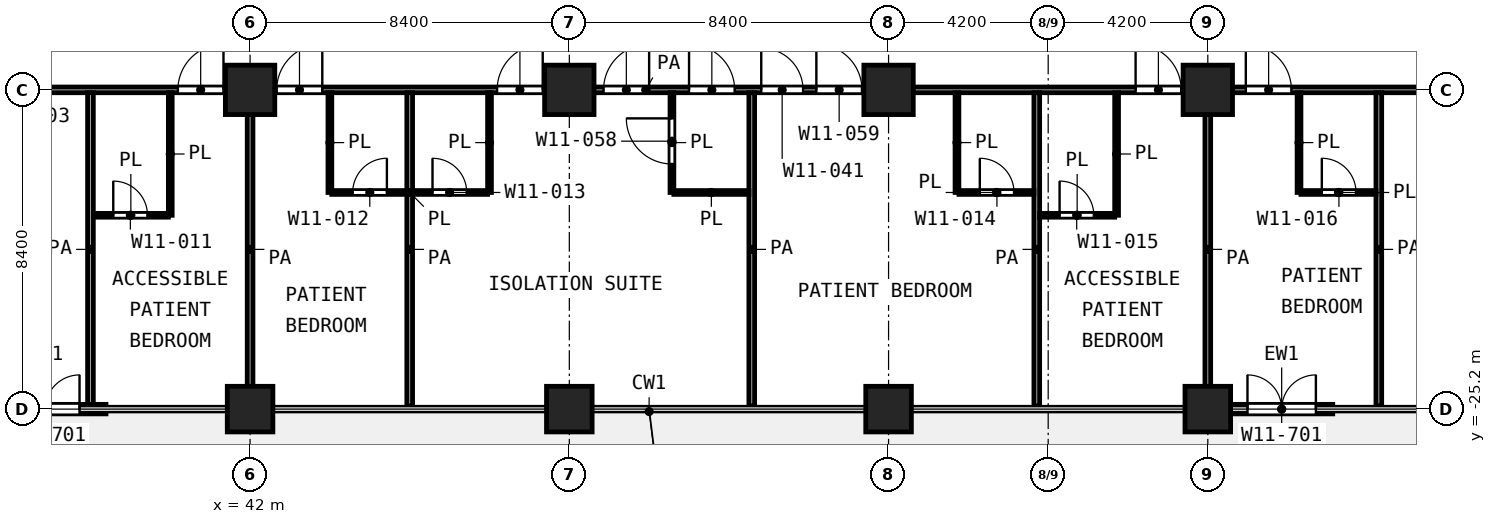
"""IFC4 building model, lengths in metres.
Left out: names, types, materials, properties, quantities, classifications, styles, units other than length and angle.
Written with IfcOpenShell. Run it as: python <this file> out.ifc"""

import sys

from ifc_helpers import new_model, si_unit, direction, frame, frame_2d, origin, origin_2d, place, context, subcontext, project, spatial, rectangle, extrude, element, fill, save


model = new_model("IFC4")
c1 = context("Model", 3, precision=1e-05, world=origin(), true_north=direction((0.0, 1.0)))
c2 = subcontext(c1, "Body", "Model", "MODEL_VIEW")
j1 = project(units=[si_unit("LENGTHUNIT", "METRE"), si_unit("PLANEANGLEUNIT", "RADIAN")], contexts=[c1])
p1 = place(None, origin())
s1 = spatial("IfcSite", under=j1, at=p1, CompositionType="ELEMENT")
p2 = place(p1, origin())
s2 = spatial("IfcBuilding", under=s1, at=p2, CompositionType="ELEMENT")
p3 = place(p2, frame((0.0, 0.0, 72.8)))
s3 = spatial("IfcBuildingStorey", under=s2, at=p3, CompositionType="ELEMENT", Elevation=72.8)
for number, where, z_axis, x_axis in (
    (1, (42.0, -16.8, 0.0), (0.0, 0.0, 1.0), (1.0, 0.0, 0.0)),
    (2, (50.4, -16.8, 0.0), (0.0, 0.0, 1.0), (1.0, 0.0, 0.0)),
    (3, (58.8, -16.8, 0.0), (0.0, 0.0, 1.0), (1.0, 0.0, 0.0)),
    (4, (67.2, -16.8, 0.0), (0.0, 0.0, 1.0), (1.0, 0.0, 0.0)),
):
    element("IfcColumn", number, at=place(p3, frame(where, z_axis=z_axis, x_axis=x_axis)), inside=s3, PredefinedType="COLUMN", context=c2, shape_type="SweptSolid", body=[
        extrude(rectangle(XDim=1.3, YDim=1.3, at=origin_2d()), origin(), (0.0, 0.0, 1.0), 4.2),
    ])
for number, where, z_axis, x_axis in (
    (5, (42.0, -25.2, 0.0), (0.0, 0.0, 1.0), (1.0, 0.0, 0.0)),
    (6, (50.4, -25.2, 0.0), (0.0, 0.0, 1.0), (1.0, 0.0, 0.0)),
    (7, (58.8, -25.2, 0.0), (0.0, 0.0, 1.0), (1.0, 0.0, 0.0)),
    (8, (67.2, -25.2, 0.0), (0.0, 0.0, 1.0), (1.0, 0.0, 0.0)),
):
    element("IfcColumn", number, at=place(p3, frame(where, z_axis=z_axis, x_axis=x_axis)), inside=s3, PredefinedType="COLUMN", context=c2, shape_type="SweptSolid", body=[
        extrude(rectangle(XDim=1.2, YDim=1.2, at=origin_2d()), origin(), (0.0, 0.0, 1.0), 4.2),
    ])
p4 = place(p3, frame((35.017, -25.2, 0.0), z_axis=(0.0, 0.0, 1.0), x_axis=(1.0, 0.0, 0.0)))
e9 = element("IfcWall", 9, at=p4, inside=s3, PredefinedType="SOLIDWALL", context=c2, shape_type="SweptSolid", body=[
    extrude(rectangle(XDim=3.192, YDim=0.25, at=frame_2d((1.596, 0.0))), origin(), (0.0, 0.0, 1.0), 3.78),
])
p5 = place(p4, frame((0.696, 0.0, 0.0)))
e10 = element("IfcOpeningElement", 10, at=p5, cuts=e9, PredefinedType="OPENING", context=c2, shape_type="SweptSolid", body=[
    extrude(rectangle(XDim=1.8, YDim=2.1, at=frame_2d((0.9, 1.05))), frame((0.0, 0.135, 0.0), z_axis=(0.0, -1.0, 0.0), x_axis=(1.0, 0.0, 0.0)), (0.0, 0.0, 1.0), 0.27),
])
p6 = place(p3, frame((67.8, -25.2, 0.0), z_axis=(0.0, 0.0, 1.0), x_axis=(1.0, 0.0, 0.0)))
e11 = element("IfcWall", 11, at=p6, inside=s3, PredefinedType="SOLIDWALL", context=c2, shape_type="SweptSolid", body=[
    extrude(rectangle(XDim=2.688, YDim=0.25, at=frame_2d((1.344, 0.0))), origin(), (0.0, 0.0, 1.0), 3.78),
])
p7 = place(p6, frame((0.444, 0.0, 0.0)))
e12 = element("IfcOpeningElement", 12, at=p7, cuts=e11, PredefinedType="OPENING", context=c2, shape_type="SweptSolid", body=[
    extrude(rectangle(XDim=1.8, YDim=2.1, at=frame_2d((0.9, 1.05))), frame((0.0, 0.135, 0.0), z_axis=(0.0, -1.0, 0.0), x_axis=(1.0, 0.0, 0.0)), (0.0, 0.0, 1.0), 0.27),
])
p8 = place(p3, frame((37.875, -20.1, 0.0), z_axis=(0.0, 0.0, 1.0), x_axis=(1.0, 0.0, 0.0)))
e13 = element("IfcWall", 13, at=p8, inside=s3, PredefinedType="PARTITIONING", context=c2, shape_type="SweptSolid", body=[
    extrude(rectangle(XDim=1.975, YDim=0.1, at=frame_2d((0.988, 0.0))), origin(), (0.0, 0.0, 1.0), 3.9),
])
p9 = place(p8, frame((0.525, 0.0, 0.0)))
e14 = element("IfcOpeningElement", 14, at=p9, cuts=e13, PredefinedType="OPENING", context=c2, shape_type="SweptSolid", body=[
    extrude(rectangle(XDim=0.9, YDim=2.1, at=frame_2d((0.45, 1.05))), frame((0.0, 0.06, 0.0), z_axis=(0.0, -1.0, 0.0), x_axis=(1.0, 0.0, 0.0)), (0.0, 0.0, 1.0), 0.12),
])
p10 = place(p3, frame((62.775, -20.1, 0.0), z_axis=(0.0, 0.0, 1.0), x_axis=(1.0, 0.0, 0.0)))
e15 = element("IfcWall", 15, at=p10, inside=s3, PredefinedType="PARTITIONING", context=c2, shape_type="SweptSolid", body=[
    extrude(rectangle(XDim=1.975, YDim=0.1, at=frame_2d((0.988, 0.0))), origin(), (0.0, 0.0, 1.0), 3.9),
])
p11 = place(p10, frame((0.525, 0.0, 0.0)))
e16 = element("IfcOpeningElement", 16, at=p11, cuts=e15, PredefinedType="OPENING", context=c2, shape_type="SweptSolid", body=[
    extrude(rectangle(XDim=0.9, YDim=2.1, at=frame_2d((0.45, 1.05))), frame((0.0, 0.06, 0.0), z_axis=(0.0, -1.0, 0.0), x_axis=(1.0, 0.0, 0.0)), (0.0, 0.0, 1.0), 0.12),
])
p12 = place(p3, frame((44.15, -19.5, 0.0), z_axis=(0.0, 0.0, 1.0), x_axis=(1.0, 0.0, 0.0)))
e17 = element("IfcWall", 17, at=p12, inside=s3, PredefinedType="PARTITIONING", context=c2, shape_type="SweptSolid", body=[
    extrude(rectangle(XDim=4.1, YDim=0.1, at=frame_2d((2.05, 0.0))), origin(), (0.0, 0.0, 1.0), 3.9),
])
p13 = place(p12, frame((0.55, 0.0, 0.0)))
e18 = element("IfcOpeningElement", 18, at=p13, cuts=e17, PredefinedType="OPENING", context=c2, shape_type="SweptSolid", body=[
    extrude(rectangle(XDim=0.9, YDim=2.1, at=frame_2d((0.45, 1.05))), frame((0.0, 0.06, 0.0), z_axis=(0.0, -1.0, 0.0), x_axis=(1.0, 0.0, 0.0)), (0.0, 0.0, 1.0), 0.12),
])
p14 = place(p12, frame((2.65, 0.0, 0.0)))
e19 = element("IfcOpeningElement", 19, at=p14, cuts=e17, PredefinedType="OPENING", context=c2, shape_type="SweptSolid", body=[
    extrude(rectangle(XDim=0.9, YDim=2.1, at=frame_2d((0.45, 1.05))), frame((0.0, 0.06, 0.0), z_axis=(0.0, -1.0, 0.0), x_axis=(1.0, 0.0, 0.0)), (0.0, 0.0, 1.0), 0.12),
])
p15 = place(p3, frame((53.15, -19.5, 0.0), z_axis=(0.0, 0.0, 1.0), x_axis=(1.0, 0.0, 0.0)))
e20 = element("IfcWall", 20, at=p15, inside=s3, PredefinedType="PARTITIONING", context=c2, shape_type="SweptSolid", body=[
    extrude(rectangle(XDim=1.975, YDim=0.1, at=frame_2d((0.988, 0.0))), origin(), (0.0, 0.0, 1.0), 3.9),
])
p16 = place(p3, frame((60.652, -19.5, 0.0), z_axis=(0.0, 0.0, 1.0), x_axis=(1.0, 0.0, 0.0)))
e21 = element("IfcWall", 21, at=p16, inside=s3, PredefinedType="PARTITIONING", context=c2, shape_type="SweptSolid", body=[
    extrude(rectangle(XDim=1.973, YDim=0.1, at=frame_2d((0.986, 0.0))), origin(), (0.0, 0.0, 1.0), 3.9),
])
p17 = place(p16, frame((0.549, 0.0, 0.0)))
e22 = element("IfcOpeningElement", 22, at=p17, cuts=e21, PredefinedType="OPENING", context=c2, shape_type="SweptSolid", body=[
    extrude(rectangle(XDim=0.9, YDim=2.1, at=frame_2d((0.45, 1.05))), frame((0.0, 0.06, 0.0), z_axis=(0.0, -1.0, 0.0), x_axis=(1.0, 0.0, 0.0)), (0.0, 0.0, 1.0), 0.12),
])
p18 = place(p3, frame((69.65, -19.5, 0.0), z_axis=(0.0, 0.0, 1.0), x_axis=(1.0, 0.0, 0.0)))
e23 = element("IfcWall", 23, at=p18, inside=s3, PredefinedType="PARTITIONING", context=c2, shape_type="SweptSolid", body=[
    extrude(rectangle(XDim=1.975, YDim=0.1, at=frame_2d((0.988, 0.0))), origin(), (0.0, 0.0, 1.0), 3.9),
])
p19 = place(p18, frame((0.55, 0.0, 0.0)))
e24 = element("IfcOpeningElement", 24, at=p19, cuts=e23, PredefinedType="OPENING", context=c2, shape_type="SweptSolid", body=[
    extrude(rectangle(XDim=0.9, YDim=2.1, at=frame_2d((0.45, 1.05))), frame((0.0, 0.06, 0.0), z_axis=(0.0, -1.0, 0.0), x_axis=(1.0, 0.0, 0.0)), (0.0, 0.0, 1.0), 0.12),
])
p20 = place(p3, frame((39.9, -20.1, 0.0), z_axis=(0.0, 0.0, 1.0), x_axis=(0.0, 1.0, 0.0)))
e25 = element("IfcWall", 25, at=p20, inside=s3, PredefinedType="PARTITIONING", context=c2, shape_type="SweptSolid", body=[
    extrude(rectangle(XDim=3.225, YDim=0.1, at=frame_2d((1.613, 0.0))), origin(), (0.0, 0.0, 1.0), 3.9),
])
for number, where, z_axis, x_axis in (
    (26, (44.1, -19.5, 0.0), (0.0, 0.0, 1.0), (0.0, 1.0, 0.0)),
    (27, (48.3, -19.5, 0.0), (0.0, 0.0, 1.0), (0.0, 1.0, 0.0)),
):
    element("IfcWall", number, at=place(p3, frame(where, z_axis=z_axis, x_axis=x_axis)), inside=s3, PredefinedType="PARTITIONING", context=c2, shape_type="SweptSolid", body=[
        extrude(rectangle(XDim=2.625, YDim=0.1, at=frame_2d((1.312, 0.0))), origin(), (0.0, 0.0, 1.0), 3.9),
    ])
p21 = place(p3, frame((53.1, -19.5, 0.0), z_axis=(0.0, 0.0, 1.0), x_axis=(0.0, 1.0, 0.0)))
e28 = element("IfcWall", 28, at=p21, inside=s3, PredefinedType="PARTITIONING", context=c2, shape_type="SweptSolid", body=[
    extrude(rectangle(XDim=2.625, YDim=0.1, at=frame_2d((1.312, 0.0))), origin(), (0.0, 0.0, 1.0), 3.9),
])
p22 = place(p21, frame((0.75, 0.0, 0.0)))
e29 = element("IfcOpeningElement", 29, at=p22, cuts=e28, PredefinedType="OPENING", context=c2, shape_type="SweptSolid", body=[
    extrude(rectangle(XDim=1.2, YDim=2.1, at=frame_2d((0.6, 1.05))), frame((0.0, 0.06, 0.0), z_axis=(0.0, -1.0, 0.0), x_axis=(1.0, 0.0, 0.0)), (0.0, 0.0, 1.0), 0.12),
])
p23 = place(p3, frame((60.6, -19.499, 0.0), z_axis=(0.0, 0.0, 1.0), x_axis=(0.0, 1.0, 0.0)))
e30 = element("IfcWall", 30, at=p23, inside=s3, PredefinedType="PARTITIONING", context=c2, shape_type="SweptSolid", body=[
    extrude(rectangle(XDim=2.624, YDim=0.1, at=frame_2d((1.312, 0.0))), origin(), (0.0, 0.0, 1.0), 3.9),
])
p24 = place(p3, frame((64.8, -20.1, 0.0), z_axis=(0.0, 0.0, 1.0), x_axis=(0.0, 1.0, 0.0)))
e31 = element("IfcWall", 31, at=p24, inside=s3, PredefinedType="PARTITIONING", context=c2, shape_type="SweptSolid", body=[
    extrude(rectangle(XDim=3.225, YDim=0.1, at=frame_2d((1.613, 0.0))), origin(), (0.0, 0.0, 1.0), 3.9),
])
p25 = place(p3, frame((69.6, -19.5, 0.0), z_axis=(0.0, 0.0, 1.0), x_axis=(0.0, 1.0, 0.0)))
e32 = element("IfcWall", 32, at=p25, inside=s3, PredefinedType="PARTITIONING", context=c2, shape_type="SweptSolid", body=[
    extrude(rectangle(XDim=2.625, YDim=0.1, at=frame_2d((1.312, 0.0))), origin(), (0.0, 0.0, 1.0), 3.9),
])
p26 = place(p3, frame((25.1, -16.8, 0.0), z_axis=(0.0, 0.0, 1.0), x_axis=(1.0, 0.0, 0.0)))
e33 = element("IfcWall", 33, at=p26, inside=s3, PredefinedType="PARTITIONING", context=c2, shape_type="SweptSolid", body=[
    extrude(rectangle(XDim=54.62, YDim=0.15, at=frame_2d((27.31, 0.0))), origin(), (0.0, 0.0, 1.0), 3.9),
])
p27 = place(p26, frame((1.45, 0.0, 0.0)))
e34 = element("IfcOpeningElement", 34, at=p27, cuts=e33, PredefinedType="OPENING", context=c2, shape_type="SweptSolid", body=[
    extrude(rectangle(XDim=1.5, YDim=2.1, at=frame_2d((0.75, 1.05))), frame((0.0, 0.085, 0.0), z_axis=(0.0, -1.0, 0.0), x_axis=(1.0, 0.0, 0.0)), (0.0, 0.0, 1.0), 0.17),
])
p28 = place(p26, frame((9.25, 0.0, 0.0)))
e35 = element("IfcOpeningElement", 35, at=p28, cuts=e33, PredefinedType="OPENING", context=c2, shape_type="SweptSolid", body=[
    extrude(rectangle(XDim=1.5, YDim=2.1, at=frame_2d((0.75, 1.05))), frame((0.0, 0.085, 0.0), z_axis=(0.0, -1.0, 0.0), x_axis=(1.0, 0.0, 0.0)), (0.0, 0.0, 1.0), 0.17),
])
p29 = place(p26, frame((15.0, 0.0, 0.0)))
e36 = element("IfcOpeningElement", 36, at=p29, cuts=e33, PredefinedType="OPENING", context=c2, shape_type="SweptSolid", body=[
    extrude(rectangle(XDim=1.2, YDim=2.1, at=frame_2d((0.6, 1.05))), frame((0.0, 0.085, 0.0), z_axis=(0.0, -1.0, 0.0), x_axis=(1.0, 0.0, 0.0)), (0.0, 0.0, 1.0), 0.17),
])
p30 = place(p26, frame((17.6, 0.0, 0.0)))
e37 = element("IfcOpeningElement", 37, at=p30, cuts=e33, PredefinedType="OPENING", context=c2, shape_type="SweptSolid", body=[
    extrude(rectangle(XDim=1.2, YDim=2.1, at=frame_2d((0.6, 1.05))), frame((0.0, 0.085, 0.0), z_axis=(0.0, -1.0, 0.0), x_axis=(1.0, 0.0, 0.0)), (0.0, 0.0, 1.0), 0.17),
])
p31 = place(p26, frame((26.2, 0.0, 0.0)))
e38 = element("IfcOpeningElement", 38, at=p31, cuts=e33, PredefinedType="OPENING", context=c2, shape_type="SweptSolid", body=[
    extrude(rectangle(XDim=1.2, YDim=2.1, at=frame_2d((0.6, 1.05))), frame((0.0, 0.085, 0.0), z_axis=(0.0, -1.0, 0.0), x_axis=(1.0, 0.0, 0.0)), (0.0, 0.0, 1.0), 0.17),
])
p32 = place(p26, frame((23.4, 0.0, 0.0)))
e39 = element("IfcOpeningElement", 39, at=p32, cuts=e33, PredefinedType="OPENING", context=c2, shape_type="SweptSolid", body=[
    extrude(rectangle(XDim=1.2, YDim=2.1, at=frame_2d((0.6, 1.05))), frame((0.0, 0.085, 0.0), z_axis=(0.0, -1.0, 0.0), x_axis=(1.0, 0.0, 0.0)), (0.0, 0.0, 1.0), 0.17),
])
p33 = place(p26, frame((28.45, 0.0, 0.0)))
e40 = element("IfcOpeningElement", 40, at=p33, cuts=e33, PredefinedType="OPENING", context=c2, shape_type="SweptSolid", body=[
    extrude(rectangle(XDim=1.2, YDim=2.1, at=frame_2d((0.6, 1.05))), frame((0.0, 0.085, 0.0), z_axis=(0.0, -1.0, 0.0), x_axis=(1.0, 0.0, 0.0)), (0.0, 0.0, 1.0), 0.17),
])
p34 = place(p26, frame((31.8, 0.0, 0.0)))
e41 = element("IfcOpeningElement", 41, at=p34, cuts=e33, PredefinedType="OPENING", context=c2, shape_type="SweptSolid", body=[
    extrude(rectangle(XDim=1.2, YDim=2.1, at=frame_2d((0.6, 1.05))), frame((0.0, 0.085, 0.0), z_axis=(0.0, -1.0, 0.0), x_axis=(1.0, 0.0, 0.0)), (0.0, 0.0, 1.0), 0.17),
])
p35 = place(p26, frame((30.35, 0.0, 0.0)))
e42 = element("IfcOpeningElement", 42, at=p35, cuts=e33, PredefinedType="OPENING", context=c2, shape_type="SweptSolid", body=[
    extrude(rectangle(XDim=1.1, YDim=2.1, at=frame_2d((0.55, 1.05))), frame((0.0, 0.085, 0.0), z_axis=(0.0, -1.0, 0.0), x_axis=(1.0, 0.0, 0.0)), (0.0, 0.0, 1.0), 0.17),
])
p36 = place(p26, frame((40.2, 0.0, 0.0)))
e43 = element("IfcOpeningElement", 43, at=p36, cuts=e33, PredefinedType="OPENING", context=c2, shape_type="SweptSolid", body=[
    extrude(rectangle(XDim=1.2, YDim=2.1, at=frame_2d((0.6, 1.05))), frame((0.0, 0.085, 0.0), z_axis=(0.0, -1.0, 0.0), x_axis=(1.0, 0.0, 0.0)), (0.0, 0.0, 1.0), 0.17),
])
p37 = place(p26, frame((43.1, 0.0, 0.0)))
e44 = element("IfcOpeningElement", 44, at=p37, cuts=e33, PredefinedType="OPENING", context=c2, shape_type="SweptSolid", body=[
    extrude(rectangle(XDim=1.2, YDim=2.1, at=frame_2d((0.6, 1.05))), frame((0.0, 0.085, 0.0), z_axis=(0.0, -1.0, 0.0), x_axis=(1.0, 0.0, 0.0)), (0.0, 0.0, 1.0), 0.17),
])
p38 = place(p26, frame((51.2, 0.0, 0.0)))
e45 = element("IfcOpeningElement", 45, at=p38, cuts=e33, PredefinedType="OPENING", context=c2, shape_type="SweptSolid", body=[
    extrude(rectangle(XDim=1.5, YDim=2.1, at=frame_2d((0.75, 1.05))), frame((0.0, 0.085, 0.0), z_axis=(0.0, -1.0, 0.0), x_axis=(1.0, 0.0, 0.0)), (0.0, 0.0, 1.0), 0.17),
])
for number, where, z_axis, x_axis in (
    (46, (37.8, -25.12, 0.0), (0.0, 0.0, 1.0), (0.0, 1.0, 0.0)),
    (47, (42.0, -25.12, 0.0), (0.0, 0.0, 1.0), (0.0, 1.0, 0.0)),
    (48, (46.2, -25.12, 0.0), (0.0, 0.0, 1.0), (0.0, 1.0, 0.0)),
    (49, (55.2, -25.12, 0.0), (0.0, 0.0, 1.0), (0.0, 1.0, 0.0)),
    (50, (62.7, -25.12, 0.0), (0.0, 0.0, 1.0), (0.0, 1.0, 0.0)),
    (51, (67.2, -25.12, 0.0), (0.0, 0.0, 1.0), (0.0, 1.0, 0.0)),
    (52, (71.7, -25.12, 0.0), (0.0, 0.0, 1.0), (0.0, 1.0, 0.0)),
):
    element("IfcWall", number, at=place(p3, frame(where, z_axis=z_axis, x_axis=x_axis)), inside=s3, PredefinedType="PARTITIONING", context=c2, shape_type="SweptSolid", body=[
        extrude(rectangle(XDim=8.245, YDim=0.15, at=frame_2d((4.123, 0.0))), origin(), (0.0, 0.0, 1.0), 3.9),
    ])
p39 = place(p5, origin())
e53 = element("IfcDoor", 53, at=p39, inside=s3, OperationType="DOUBLE_DOOR_SINGLE_SWING", PredefinedType="DOOR", context=c2, shape_type="SweptSolid", body=[
    extrude(rectangle(XDim=1.8, YDim=2.1, at=frame_2d((0.9, 1.05))), frame((0.0, 0.025, 0.0), z_axis=(0.0, -1.0, 0.0), x_axis=(1.0, 0.0, 0.0)), (0.0, 0.0, 1.0), 0.05),
])
fill(e10, e53)
p40 = place(p7, origin())
e54 = element("IfcDoor", 54, at=p40, inside=s3, OperationType="DOUBLE_DOOR_SINGLE_SWING", PredefinedType="DOOR", context=c2, shape_type="SweptSolid", body=[
    extrude(rectangle(XDim=1.8, YDim=2.1, at=frame_2d((0.9, 1.05))), frame((0.0, 0.025, 0.0), z_axis=(0.0, -1.0, 0.0), x_axis=(1.0, 0.0, 0.0)), (0.0, 0.0, 1.0), 0.05),
])
fill(e12, e54)
p41 = place(p29, origin())
e55 = element("IfcDoor", 55, at=p41, inside=s3, OperationType="SINGLE_SWING_RIGHT", PredefinedType="DOOR", context=c2, shape_type="SweptSolid", body=[
    extrude(rectangle(XDim=1.2, YDim=2.1, at=frame_2d((0.6, 1.05))), frame((0.0, 0.025, 0.0), z_axis=(0.0, -1.0, 0.0), x_axis=(1.0, 0.0, 0.0)), (0.0, 0.0, 1.0), 0.05),
])
fill(e36, e55)
p42 = place(p9, origin())
e56 = element("IfcDoor", 56, at=p42, inside=s3, OperationType="SINGLE_SWING_LEFT", PredefinedType="DOOR", context=c2, shape_type="SweptSolid", body=[
    extrude(rectangle(XDim=0.9, YDim=2.1, at=frame_2d((0.45, 1.05))), frame((0.0, 0.025, 0.0), z_axis=(0.0, -1.0, 0.0), x_axis=(1.0, 0.0, 0.0)), (0.0, 0.0, 1.0), 0.05),
])
fill(e14, e56)
p43 = place(p30, origin())
e57 = element("IfcDoor", 57, at=p43, inside=s3, OperationType="SINGLE_SWING_RIGHT", PredefinedType="DOOR", context=c2, shape_type="SweptSolid", body=[
    extrude(rectangle(XDim=1.2, YDim=2.1, at=frame_2d((0.6, 1.05))), frame((0.0, 0.025, 0.0), z_axis=(0.0, -1.0, 0.0), x_axis=(1.0, 0.0, 0.0)), (0.0, 0.0, 1.0), 0.05),
])
fill(e37, e57)
p44 = place(p13, origin())
e58 = element("IfcDoor", 58, at=p44, inside=s3, OperationType="SINGLE_SWING_RIGHT", PredefinedType="DOOR", context=c2, shape_type="SweptSolid", body=[
    extrude(rectangle(XDim=0.9, YDim=2.1, at=frame_2d((0.45, 1.05))), frame((0.0, 0.025, 0.0), z_axis=(0.0, -1.0, 0.0), x_axis=(1.0, 0.0, 0.0)), (0.0, 0.0, 1.0), 0.05),
])
fill(e18, e58)
p45 = place(p31, origin())
e59 = element("IfcDoor", 59, at=p45, inside=s3, OperationType="SINGLE_SWING_RIGHT", PredefinedType="DOOR", context=c2, shape_type="SweptSolid", body=[
    extrude(rectangle(XDim=1.2, YDim=2.1, at=frame_2d((0.6, 1.05))), frame((0.0, 0.025, 0.0), z_axis=(0.0, -1.0, 0.0), x_axis=(1.0, 0.0, 0.0)), (0.0, 0.0, 1.0), 0.05),
])
fill(e38, e59)
p46 = place(p32, origin())
e60 = element("IfcDoor", 60, at=p46, inside=s3, OperationType="SINGLE_SWING_RIGHT", PredefinedType="DOOR", context=c2, shape_type="SweptSolid", body=[
    extrude(rectangle(XDim=1.2, YDim=2.1, at=frame_2d((0.6, 1.05))), frame((0.0, 0.025, 0.0), z_axis=(0.0, -1.0, 0.0), x_axis=(1.0, 0.0, 0.0)), (0.0, 0.0, 1.0), 0.05),
])
fill(e39, e60)
p47 = place(p33, origin())
e61 = element("IfcDoor", 61, at=p47, inside=s3, OperationType="SINGLE_SWING_LEFT", PredefinedType="DOOR", context=c2, shape_type="SweptSolid", body=[
    extrude(rectangle(XDim=1.2, YDim=2.1, at=frame_2d((0.6, 1.05))), frame((0.0, 0.025, 0.0), z_axis=(0.0, -1.0, 0.0), x_axis=(1.0, 0.0, 0.0)), (0.0, 0.0, 1.0), 0.05),
])
fill(e40, e61)
p48 = place(p22, origin())
e62 = element("IfcDoor", 62, at=p48, inside=s3, OperationType="SINGLE_SWING_RIGHT", PredefinedType="DOOR", context=c2, shape_type="SweptSolid", body=[
    extrude(rectangle(XDim=1.2, YDim=2.1, at=frame_2d((0.6, 1.05))), frame((0.0, 0.025, 0.0), z_axis=(0.0, -1.0, 0.0), x_axis=(1.0, 0.0, 0.0)), (0.0, 0.0, 1.0), 0.05),
])
fill(e29, e62)
p49 = place(p14, origin())
e63 = element("IfcDoor", 63, at=p49, inside=s3, OperationType="SINGLE_SWING_LEFT", PredefinedType="DOOR", context=c2, shape_type="SweptSolid", body=[
    extrude(rectangle(XDim=0.9, YDim=2.1, at=frame_2d((0.45, 1.05))), frame((0.0, 0.025, 0.0), z_axis=(0.0, -1.0, 0.0), x_axis=(1.0, 0.0, 0.0)), (0.0, 0.0, 1.0), 0.05),
])
fill(e19, e63)
p50 = place(p34, origin())
e64 = element("IfcDoor", 64, at=p50, inside=s3, OperationType="SINGLE_SWING_LEFT", PredefinedType="DOOR", context=c2, shape_type="SweptSolid", body=[
    extrude(rectangle(XDim=1.2, YDim=2.1, at=frame_2d((0.6, 1.05))), frame((0.0, 0.025, 0.0), z_axis=(0.0, -1.0, 0.0), x_axis=(1.0, 0.0, 0.0)), (0.0, 0.0, 1.0), 0.05),
])
fill(e41, e64)
p51 = place(p35, origin())
e65 = element("IfcDoor", 65, at=p51, inside=s3, OperationType="SINGLE_SWING_LEFT", PredefinedType="DOOR", context=c2, shape_type="SweptSolid", body=[
    extrude(rectangle(XDim=1.1, YDim=2.1, at=frame_2d((0.55, 1.05))), frame((0.0, 0.025, 0.0), z_axis=(0.0, -1.0, 0.0), x_axis=(1.0, 0.0, 0.0)), (0.0, 0.0, 1.0), 0.05),
])
fill(e42, e65)
p52 = place(p17, origin())
e66 = element("IfcDoor", 66, at=p52, inside=s3, OperationType="SINGLE_SWING_LEFT", PredefinedType="DOOR", context=c2, shape_type="SweptSolid", body=[
    extrude(rectangle(XDim=0.9, YDim=2.1, at=frame_2d((0.45, 1.05))), frame((0.0, 0.025, 0.0), z_axis=(0.0, -1.0, 0.0), x_axis=(1.0, 0.0, 0.0)), (0.0, 0.0, 1.0), 0.05),
])
fill(e22, e66)
p53 = place(p36, origin())
e67 = element("IfcDoor", 67, at=p53, inside=s3, OperationType="SINGLE_SWING_LEFT", PredefinedType="DOOR", context=c2, shape_type="SweptSolid", body=[
    extrude(rectangle(XDim=1.2, YDim=2.1, at=frame_2d((0.6, 1.05))), frame((0.0, 0.025, 0.0), z_axis=(0.0, -1.0, 0.0), x_axis=(1.0, 0.0, 0.0)), (0.0, 0.0, 1.0), 0.05),
])
fill(e43, e67)
p54 = place(p11, origin())
e68 = element("IfcDoor", 68, at=p54, inside=s3, OperationType="SINGLE_SWING_LEFT", PredefinedType="DOOR", context=c2, shape_type="SweptSolid", body=[
    extrude(rectangle(XDim=0.9, YDim=2.1, at=frame_2d((0.45, 1.05))), frame((0.0, 0.025, 0.0), z_axis=(0.0, -1.0, 0.0), x_axis=(1.0, 0.0, 0.0)), (0.0, 0.0, 1.0), 0.05),
])
fill(e16, e68)
p55 = place(p37, origin())
e69 = element("IfcDoor", 69, at=p55, inside=s3, OperationType="SINGLE_SWING_LEFT", PredefinedType="DOOR", context=c2, shape_type="SweptSolid", body=[
    extrude(rectangle(XDim=1.2, YDim=2.1, at=frame_2d((0.6, 1.05))), frame((0.0, 0.025, 0.0), z_axis=(0.0, -1.0, 0.0), x_axis=(1.0, 0.0, 0.0)), (0.0, 0.0, 1.0), 0.05),
])
fill(e44, e69)
p56 = place(p19, origin())
e70 = element("IfcDoor", 70, at=p56, inside=s3, OperationType="SINGLE_SWING_LEFT", PredefinedType="DOOR", context=c2, shape_type="SweptSolid", body=[
    extrude(rectangle(XDim=0.9, YDim=2.1, at=frame_2d((0.45, 1.05))), frame((0.0, 0.025, 0.0), z_axis=(0.0, -1.0, 0.0), x_axis=(1.0, 0.0, 0.0)), (0.0, 0.0, 1.0), 0.05),
])
fill(e24, e70)
save(model, sys.argv[1])
